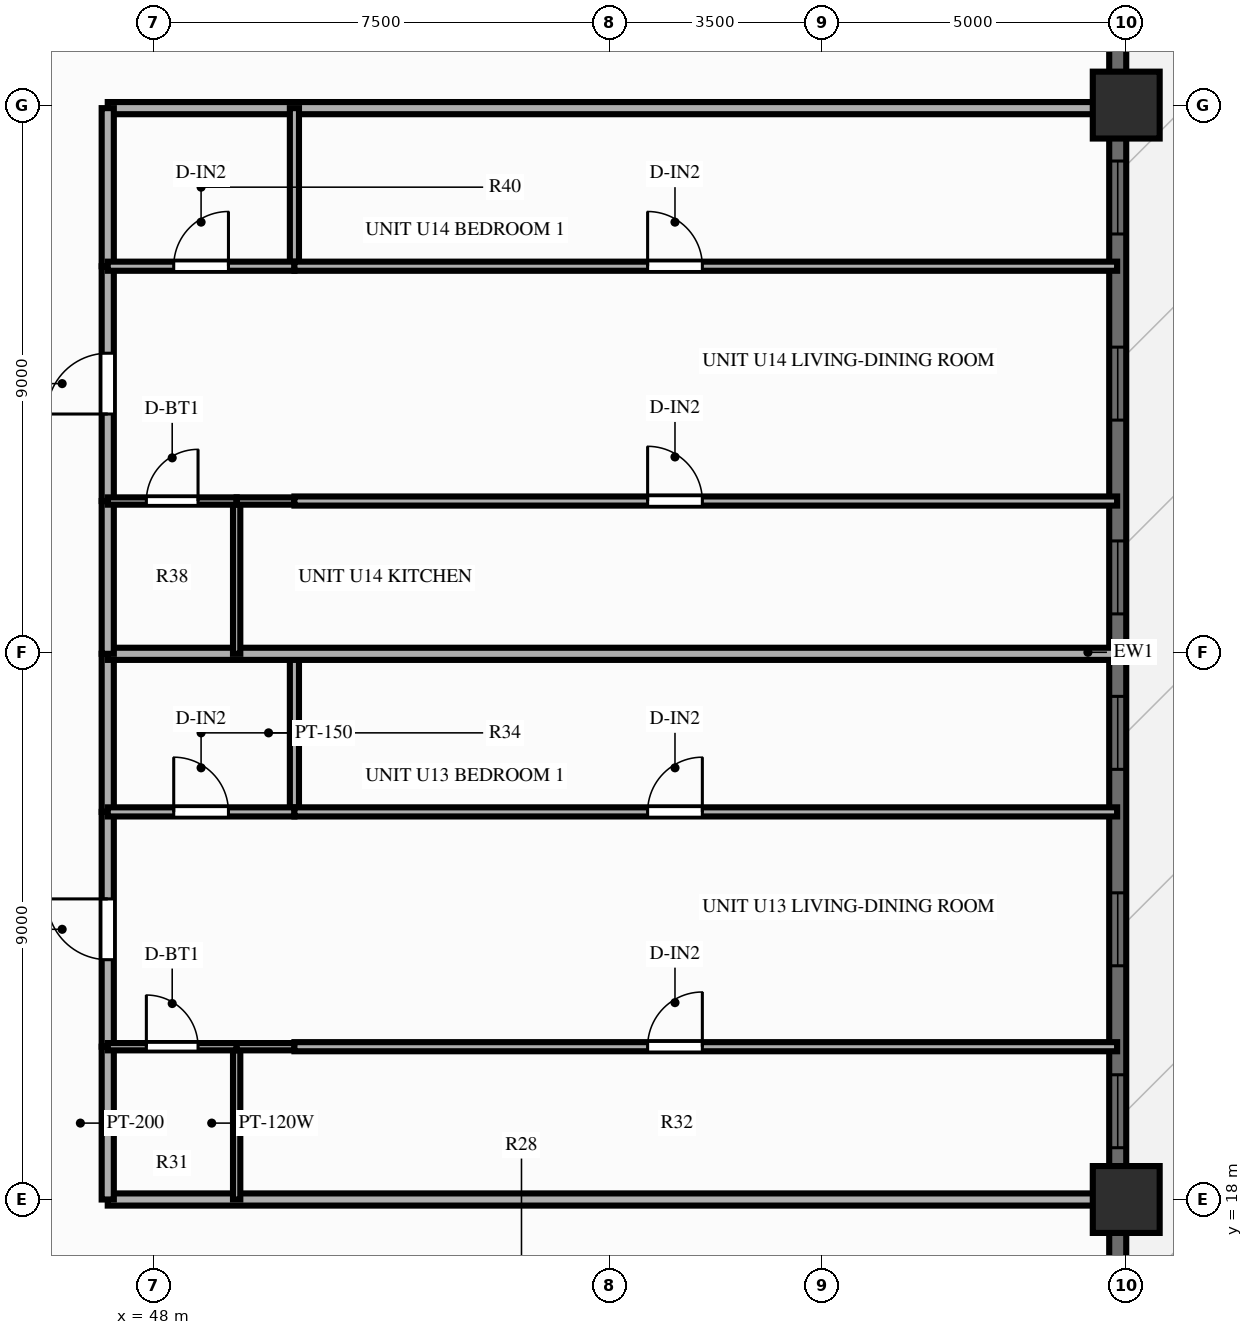
"""IFC4 building model, lengths in metres.
Left out: names, types, materials, properties, quantities, classifications, styles, units other than length and angle.
Written with IfcOpenShell. Run it as: python <this file> out.ifc"""

import sys

from ifc_helpers import new_model, si_unit, direction, frame, frame_2d, origin, origin_2d, place, context, subcontext, project, spatial, rectangle, extrude, source, transform, mapped, element, fill, save


model = new_model("IFC4")
c1 = context("Model", 3, precision=1e-05, world=origin(), true_north=direction((0.0, 1.0)))
c2 = subcontext(c1, "Body", "Model", "MODEL_VIEW")
j1 = project(units=[si_unit("LENGTHUNIT", "METRE"), si_unit("PLANEANGLEUNIT", "RADIAN")], contexts=[c1])
p1 = place(None, origin())
s1 = spatial("IfcSite", under=j1, at=p1, CompositionType="ELEMENT")
p2 = place(p1, origin())
s2 = spatial("IfcBuilding", under=s1, at=p2, CompositionType="ELEMENT")
p3 = place(p2, frame((0.0, 0.0, 22.4)))
s3 = spatial("IfcBuildingStorey", under=s2, at=p3, CompositionType="ELEMENT", Elevation=22.4)
m1 = source(origin(), c2, "Body", "SweptSolid", [
    extrude(rectangle(XDim=1.1, YDim=1.1, at=origin_2d()), origin(), (0.0, 0.0, 1.0), 3.0),
])
for number, where, z_axis, x_axis in (
    (1, (64.0, 18.0, 0.0), (0.0, 0.0, 1.0), (1.0, 0.0, 0.0)),
    (2, (64.0, 36.0, 0.0), (0.0, 0.0, 1.0), (1.0, 0.0, 0.0)),
):
    element("IfcColumn", number, at=place(p3, frame(where, z_axis=z_axis, x_axis=x_axis)), inside=s3, PredefinedType="COLUMN", context=c2, shape_type="MappedRepresentation", body=[
        mapped(m1, transform((0.0, 0.0, 0.0), scale=1.0)),
    ])
p4 = place(p3, frame((63.86, 6.5, 0.0), z_axis=(0.0, 0.0, 1.0), x_axis=(0.0, 1.0, 0.0)))
e3 = element("IfcWall", 3, at=p4, inside=s3, PredefinedType="SOLIDWALL", context=c2, shape_type="SweptSolid", body=[
    extrude(rectangle(XDim=41.0, YDim=0.28, at=frame_2d((20.5, 0.0))), origin(), (0.0, 0.0, 1.0), 2.28),
])
p5 = place(p4, frame((5.15, 0.0, 0.25)))
e4 = element("IfcOpeningElement", 4, at=p5, cuts=e3, PredefinedType="OPENING", context=c2, shape_type="SweptSolid", body=[
    extrude(rectangle(XDim=1.2, YDim=1.5, at=frame_2d((0.6, 0.75))), frame((0.0, 0.152, 0.0), z_axis=(0.0, -1.0, 0.0), x_axis=(1.0, 0.0, 0.0)), (0.0, 0.0, 1.0), 0.304),
])
p6 = place(p4, frame((12.352, 0.0, 0.25)))
e5 = element("IfcOpeningElement", 5, at=p6, cuts=e3, PredefinedType="OPENING", context=c2, shape_type="SweptSolid", body=[
    extrude(rectangle(XDim=1.2, YDim=1.5, at=frame_2d((0.6, 0.75))), frame((0.0, 0.152, 0.0), z_axis=(0.0, -1.0, 0.0), x_axis=(1.0, 0.0, 0.0)), (0.0, 0.0, 1.0), 0.304),
])
p7 = place(p4, frame((15.344, 0.0, 0.25)))
e6 = element("IfcOpeningElement", 6, at=p7, cuts=e3, PredefinedType="OPENING", context=c2, shape_type="SweptSolid", body=[
    extrude(rectangle(XDim=1.2, YDim=1.5, at=frame_2d((0.6, 0.75))), frame((0.0, 0.152, 0.0), z_axis=(0.0, -1.0, 0.0), x_axis=(1.0, 0.0, 0.0)), (0.0, 0.0, 1.0), 0.304),
])
p8 = place(p4, frame((18.575, 0.0, 0.25)))
e7 = element("IfcOpeningElement", 7, at=p8, cuts=e3, PredefinedType="OPENING", context=c2, shape_type="SweptSolid", body=[
    extrude(rectangle(XDim=1.2, YDim=1.5, at=frame_2d((0.6, 0.75))), frame((0.0, 0.152, 0.0), z_axis=(0.0, -1.0, 0.0), x_axis=(1.0, 0.0, 0.0)), (0.0, 0.0, 1.0), 0.304),
])
p9 = place(p4, frame((21.132, 0.0, 0.25)))
e8 = element("IfcOpeningElement", 8, at=p9, cuts=e3, PredefinedType="OPENING", context=c2, shape_type="SweptSolid", body=[
    extrude(rectangle(XDim=1.2, YDim=1.5, at=frame_2d((0.6, 0.75))), frame((0.0, 0.152, 0.0), z_axis=(0.0, -1.0, 0.0), x_axis=(1.0, 0.0, 0.0)), (0.0, 0.0, 1.0), 0.304),
])
p10 = place(p4, frame((24.319, 0.0, 0.25)))
e9 = element("IfcOpeningElement", 9, at=p10, cuts=e3, PredefinedType="OPENING", context=c2, shape_type="SweptSolid", body=[
    extrude(rectangle(XDim=1.2, YDim=1.5, at=frame_2d((0.6, 0.75))), frame((0.0, 0.152, 0.0), z_axis=(0.0, -1.0, 0.0), x_axis=(1.0, 0.0, 0.0)), (0.0, 0.0, 1.0), 0.304),
])
p11 = place(p4, frame((27.38, 0.0, 0.25)))
e10 = element("IfcOpeningElement", 10, at=p11, cuts=e3, PredefinedType="OPENING", context=c2, shape_type="SweptSolid", body=[
    extrude(rectangle(XDim=1.2, YDim=1.5, at=frame_2d((0.6, 0.75))), frame((0.0, 0.152, 0.0), z_axis=(0.0, -1.0, 0.0), x_axis=(1.0, 0.0, 0.0)), (0.0, 0.0, 1.0), 0.304),
])
p12 = place(p4, frame((36.05, 0.0, 0.0), z_axis=(0.0, 0.0, 1.0), x_axis=(-1.0, 0.0, 0.0)))
e11 = element("IfcOpeningElement", 11, at=p12, cuts=e3, PredefinedType="OPENING", context=c2, shape_type="SweptSolid", body=[
    extrude(rectangle(XDim=1.6, YDim=2.15, at=frame_2d((0.8, 1.075))), frame((0.0, 0.152, 0.0), z_axis=(0.0, -1.0, 0.0), x_axis=(1.0, 0.0, 0.0)), (0.0, 0.0, 1.0), 0.304),
])
for number, where, z_axis, x_axis in (
    (12, (47.25, 18.0, 0.0), (0.0, 0.0, 1.0), (1.0, 0.0, 0.0)),
    (13, (47.25, 35.95, 0.0), (0.0, 0.0, 1.0), (1.0, 0.0, 0.0)),
):
    element("IfcWall", number, at=place(p3, frame(where, z_axis=z_axis, x_axis=x_axis)), inside=s3, PredefinedType="PARTITIONING", context=c2, shape_type="SweptSolid", body=[
        extrude(rectangle(XDim=16.6, YDim=0.2, at=frame_2d((8.3, 0.0))), origin(), (0.0, 0.0, 1.0), 2.24),
    ])
p13 = place(p3, frame((47.25, 18.0, 0.0), z_axis=(0.0, 0.0, 1.0), x_axis=(0.0, 1.0, 0.0)))
e14 = element("IfcWall", 14, at=p13, inside=s3, PredefinedType="PARTITIONING", context=c2, shape_type="SweptSolid", body=[
    extrude(rectangle(XDim=2.513, YDim=0.2, at=frame_2d((1.256, 0.0))), origin(), (0.0, 0.0, 1.0), 2.79),
])
p14 = place(p3, frame((47.25, 20.513, 0.0), z_axis=(0.0, 0.0, 1.0), x_axis=(0.0, 1.0, 0.0)))
e15 = element("IfcWall", 15, at=p14, inside=s3, PredefinedType="PARTITIONING", context=c2, shape_type="SweptSolid", body=[
    extrude(rectangle(XDim=3.862, YDim=0.2, at=frame_2d((1.931, 0.0))), origin(), (0.0, 0.0, 1.0), 2.79),
])
p15 = place(p14, frame((1.431, 0.0, 0.0)))
e16 = element("IfcOpeningElement", 16, at=p15, cuts=e15, PredefinedType="OPENING", context=c2, shape_type="SweptSolid", body=[
    extrude(rectangle(XDim=1.0, YDim=2.15, at=frame_2d((0.5, 1.075))), frame((0.0, 0.112, 0.0), z_axis=(0.0, -1.0, 0.0), x_axis=(1.0, 0.0, 0.0)), (0.0, 0.0, 1.0), 0.224),
])
p16 = place(p3, frame((47.25, 24.375, 0.0), z_axis=(0.0, 0.0, 1.0), x_axis=(0.0, 1.0, 0.0)))
e17 = element("IfcWall", 17, at=p16, inside=s3, PredefinedType="PARTITIONING", context=c2, shape_type="SweptSolid", body=[
    extrude(rectangle(XDim=2.6, YDim=0.2, at=frame_2d((1.3, 0.0))), origin(), (0.0, 0.0, 1.0), 2.79),
])
p17 = place(p3, frame((49.37, 18.0, 0.0), z_axis=(0.0, 0.0, 1.0), x_axis=(0.0, 1.0, 0.0)))
e18 = element("IfcWall", 18, at=p17, inside=s3, PredefinedType="PARTITIONING", context=c2, shape_type="SweptSolid", body=[
    extrude(rectangle(XDim=2.513, YDim=0.12, at=frame_2d((1.256, 0.0))), origin(), (0.0, 0.0, 1.0), 2.79),
])
p18 = place(p3, frame((50.32, 24.375, 0.0), z_axis=(0.0, 0.0, 1.0), x_axis=(0.0, 1.0, 0.0)))
e19 = element("IfcWall", 19, at=p18, inside=s3, PredefinedType="PARTITIONING", context=c2, shape_type="SweptSolid", body=[
    extrude(rectangle(XDim=2.6, YDim=0.15, at=frame_2d((1.3, 0.0))), origin(), (0.0, 0.0, 1.0), 2.79),
])
p19 = place(p3, frame((47.25, 20.513, 0.0), z_axis=(0.0, 0.0, 1.0), x_axis=(1.0, 0.0, 0.0)))
e20 = element("IfcWall", 20, at=p19, inside=s3, PredefinedType="PARTITIONING", context=c2, shape_type="SweptSolid", body=[
    extrude(rectangle(XDim=2.12, YDim=0.12, at=frame_2d((1.06, 0.0))), origin(), (0.0, 0.0, 1.0), 2.79),
])
p20 = place(p19, frame((0.635, 0.0, 0.0)))
e21 = element("IfcOpeningElement", 21, at=p20, cuts=e20, PredefinedType="OPENING", context=c2, shape_type="SweptSolid", body=[
    extrude(rectangle(XDim=0.85, YDim=2.05, at=frame_2d((0.425, 1.025))), frame((0.0, 0.072, 0.0), z_axis=(0.0, -1.0, 0.0), x_axis=(1.0, 0.0, 0.0)), (0.0, 0.0, 1.0), 0.144),
])
p21 = place(p3, frame((49.37, 20.513, 0.0), z_axis=(0.0, 0.0, 1.0), x_axis=(1.0, 0.0, 0.0)))
e22 = element("IfcWall", 22, at=p21, inside=s3, PredefinedType="PARTITIONING", context=c2, shape_type="SweptSolid", body=[
    extrude(rectangle(XDim=0.95, YDim=0.12, at=frame_2d((0.475, 0.0))), origin(), (0.0, 0.0, 1.0), 2.79),
])
p22 = place(p3, frame((50.32, 20.513, 0.0), z_axis=(0.0, 0.0, 1.0), x_axis=(1.0, 0.0, 0.0)))
e23 = element("IfcWall", 23, at=p22, inside=s3, PredefinedType="PARTITIONING", context=c2, shape_type="SweptSolid", body=[
    extrude(rectangle(XDim=13.53, YDim=0.15, at=frame_2d((6.765, 0.0))), origin(), (0.0, 0.0, 1.0), 2.79),
])
p23 = place(p22, frame((5.809, 0.0, 0.0)))
e24 = element("IfcOpeningElement", 24, at=p23, cuts=e23, PredefinedType="OPENING", context=c2, shape_type="SweptSolid", body=[
    extrude(rectangle(XDim=0.9, YDim=2.1, at=frame_2d((0.45, 1.05))), frame((0.0, 0.087, 0.0), z_axis=(0.0, -1.0, 0.0), x_axis=(1.0, 0.0, 0.0)), (0.0, 0.0, 1.0), 0.174),
])
p24 = place(p3, frame((47.25, 24.375, 0.0), z_axis=(0.0, 0.0, 1.0), x_axis=(1.0, 0.0, 0.0)))
e25 = element("IfcWall", 25, at=p24, inside=s3, PredefinedType="PARTITIONING", context=c2, shape_type="SweptSolid", body=[
    extrude(rectangle(XDim=3.07, YDim=0.15, at=frame_2d((1.535, 0.0))), origin(), (0.0, 0.0, 1.0), 2.79),
])
p25 = place(p24, frame((1.085, 0.0, 0.0)))
e26 = element("IfcOpeningElement", 26, at=p25, cuts=e25, PredefinedType="OPENING", context=c2, shape_type="SweptSolid", body=[
    extrude(rectangle(XDim=0.9, YDim=2.1, at=frame_2d((0.45, 1.05))), frame((0.0, 0.087, 0.0), z_axis=(0.0, -1.0, 0.0), x_axis=(1.0, 0.0, 0.0)), (0.0, 0.0, 1.0), 0.174),
])
p26 = place(p3, frame((50.32, 24.375, 0.0), z_axis=(0.0, 0.0, 1.0), x_axis=(1.0, 0.0, 0.0)))
e27 = element("IfcWall", 27, at=p26, inside=s3, PredefinedType="PARTITIONING", context=c2, shape_type="SweptSolid", body=[
    extrude(rectangle(XDim=13.53, YDim=0.15, at=frame_2d((6.765, 0.0))), origin(), (0.0, 0.0, 1.0), 2.79),
])
p27 = place(p26, frame((5.809, 0.0, 0.0)))
e28 = element("IfcOpeningElement", 28, at=p27, cuts=e27, PredefinedType="OPENING", context=c2, shape_type="SweptSolid", body=[
    extrude(rectangle(XDim=0.9, YDim=2.1, at=frame_2d((0.45, 1.05))), frame((0.0, 0.087, 0.0), z_axis=(0.0, -1.0, 0.0), x_axis=(1.0, 0.0, 0.0)), (0.0, 0.0, 1.0), 0.174),
])
p28 = place(p3, frame((47.25, 26.975, 0.0), z_axis=(0.0, 0.0, 1.0), x_axis=(1.0, 0.0, 0.0)))
e29 = element("IfcWall", 29, at=p28, inside=s3, PredefinedType="PARTITIONING", context=c2, shape_type="SweptSolid", body=[
    extrude(rectangle(XDim=16.6, YDim=0.2, at=frame_2d((8.3, 0.0))), origin(), (0.0, 0.0, 1.0), 2.79),
])
p29 = place(p3, frame((47.25, 26.975, 0.0), z_axis=(0.0, 0.0, 1.0), x_axis=(0.0, 1.0, 0.0)))
e30 = element("IfcWall", 30, at=p29, inside=s3, PredefinedType="PARTITIONING", context=c2, shape_type="SweptSolid", body=[
    extrude(rectangle(XDim=2.513, YDim=0.2, at=frame_2d((1.256, 0.0))), origin(), (0.0, 0.0, 1.0), 2.79),
])
p30 = place(p3, frame((47.25, 29.488, 0.0), z_axis=(0.0, 0.0, 1.0), x_axis=(0.0, 1.0, 0.0)))
e31 = element("IfcWall", 31, at=p30, inside=s3, PredefinedType="PARTITIONING", context=c2, shape_type="SweptSolid", body=[
    extrude(rectangle(XDim=3.862, YDim=0.2, at=frame_2d((1.931, 0.0))), origin(), (0.0, 0.0, 1.0), 2.79),
])
p31 = place(p30, frame((1.431, 0.0, 0.0)))
e32 = element("IfcOpeningElement", 32, at=p31, cuts=e31, PredefinedType="OPENING", context=c2, shape_type="SweptSolid", body=[
    extrude(rectangle(XDim=1.0, YDim=2.15, at=frame_2d((0.5, 1.075))), frame((0.0, 0.112, 0.0), z_axis=(0.0, -1.0, 0.0), x_axis=(1.0, 0.0, 0.0)), (0.0, 0.0, 1.0), 0.224),
])
p32 = place(p3, frame((47.25, 33.35, 0.0), z_axis=(0.0, 0.0, 1.0), x_axis=(0.0, 1.0, 0.0)))
e33 = element("IfcWall", 33, at=p32, inside=s3, PredefinedType="PARTITIONING", context=c2, shape_type="SweptSolid", body=[
    extrude(rectangle(XDim=2.6, YDim=0.2, at=frame_2d((1.3, 0.0))), origin(), (0.0, 0.0, 1.0), 2.79),
])
p33 = place(p3, frame((49.37, 26.975, 0.0), z_axis=(0.0, 0.0, 1.0), x_axis=(0.0, 1.0, 0.0)))
e34 = element("IfcWall", 34, at=p33, inside=s3, PredefinedType="PARTITIONING", context=c2, shape_type="SweptSolid", body=[
    extrude(rectangle(XDim=2.513, YDim=0.12, at=frame_2d((1.256, 0.0))), origin(), (0.0, 0.0, 1.0), 2.79),
])
p34 = place(p3, frame((50.32, 33.35, 0.0), z_axis=(0.0, 0.0, 1.0), x_axis=(0.0, 1.0, 0.0)))
e35 = element("IfcWall", 35, at=p34, inside=s3, PredefinedType="PARTITIONING", context=c2, shape_type="SweptSolid", body=[
    extrude(rectangle(XDim=2.6, YDim=0.15, at=frame_2d((1.3, 0.0))), origin(), (0.0, 0.0, 1.0), 2.79),
])
p35 = place(p3, frame((47.25, 29.488, 0.0), z_axis=(0.0, 0.0, 1.0), x_axis=(1.0, 0.0, 0.0)))
e36 = element("IfcWall", 36, at=p35, inside=s3, PredefinedType="PARTITIONING", context=c2, shape_type="SweptSolid", body=[
    extrude(rectangle(XDim=2.12, YDim=0.12, at=frame_2d((1.06, 0.0))), origin(), (0.0, 0.0, 1.0), 2.79),
])
p36 = place(p35, frame((0.635, 0.0, 0.0)))
e37 = element("IfcOpeningElement", 37, at=p36, cuts=e36, PredefinedType="OPENING", context=c2, shape_type="SweptSolid", body=[
    extrude(rectangle(XDim=0.85, YDim=2.05, at=frame_2d((0.425, 1.025))), frame((0.0, 0.072, 0.0), z_axis=(0.0, -1.0, 0.0), x_axis=(1.0, 0.0, 0.0)), (0.0, 0.0, 1.0), 0.144),
])
p37 = place(p3, frame((49.37, 29.488, 0.0), z_axis=(0.0, 0.0, 1.0), x_axis=(1.0, 0.0, 0.0)))
e38 = element("IfcWall", 38, at=p37, inside=s3, PredefinedType="PARTITIONING", context=c2, shape_type="SweptSolid", body=[
    extrude(rectangle(XDim=0.95, YDim=0.12, at=frame_2d((0.475, 0.0))), origin(), (0.0, 0.0, 1.0), 2.79),
])
p38 = place(p3, frame((50.32, 29.488, 0.0), z_axis=(0.0, 0.0, 1.0), x_axis=(1.0, 0.0, 0.0)))
e39 = element("IfcWall", 39, at=p38, inside=s3, PredefinedType="PARTITIONING", context=c2, shape_type="SweptSolid", body=[
    extrude(rectangle(XDim=13.53, YDim=0.15, at=frame_2d((6.765, 0.0))), origin(), (0.0, 0.0, 1.0), 2.79),
])
p39 = place(p38, frame((5.809, 0.0, 0.0)))
e40 = element("IfcOpeningElement", 40, at=p39, cuts=e39, PredefinedType="OPENING", context=c2, shape_type="SweptSolid", body=[
    extrude(rectangle(XDim=0.9, YDim=2.1, at=frame_2d((0.45, 1.05))), frame((0.0, 0.087, 0.0), z_axis=(0.0, -1.0, 0.0), x_axis=(1.0, 0.0, 0.0)), (0.0, 0.0, 1.0), 0.174),
])
p40 = place(p3, frame((47.25, 33.35, 0.0), z_axis=(0.0, 0.0, 1.0), x_axis=(1.0, 0.0, 0.0)))
e41 = element("IfcWall", 41, at=p40, inside=s3, PredefinedType="PARTITIONING", context=c2, shape_type="SweptSolid", body=[
    extrude(rectangle(XDim=3.07, YDim=0.15, at=frame_2d((1.535, 0.0))), origin(), (0.0, 0.0, 1.0), 2.79),
])
p41 = place(p40, frame((1.085, 0.0, 0.0)))
e42 = element("IfcOpeningElement", 42, at=p41, cuts=e41, PredefinedType="OPENING", context=c2, shape_type="SweptSolid", body=[
    extrude(rectangle(XDim=0.9, YDim=2.1, at=frame_2d((0.45, 1.05))), frame((0.0, 0.087, 0.0), z_axis=(0.0, -1.0, 0.0), x_axis=(1.0, 0.0, 0.0)), (0.0, 0.0, 1.0), 0.174),
])
p42 = place(p3, frame((50.32, 33.35, 0.0), z_axis=(0.0, 0.0, 1.0), x_axis=(1.0, 0.0, 0.0)))
e43 = element("IfcWall", 43, at=p42, inside=s3, PredefinedType="PARTITIONING", context=c2, shape_type="SweptSolid", body=[
    extrude(rectangle(XDim=13.53, YDim=0.15, at=frame_2d((6.765, 0.0))), origin(), (0.0, 0.0, 1.0), 2.79),
])
p43 = place(p42, frame((5.809, 0.0, 0.0)))
e44 = element("IfcOpeningElement", 44, at=p43, cuts=e43, PredefinedType="OPENING", context=c2, shape_type="SweptSolid", body=[
    extrude(rectangle(XDim=0.9, YDim=2.1, at=frame_2d((0.45, 1.05))), frame((0.0, 0.087, 0.0), z_axis=(0.0, -1.0, 0.0), x_axis=(1.0, 0.0, 0.0)), (0.0, 0.0, 1.0), 0.174),
])
m2 = source(origin(), c2, "Body", "SweptSolid", [
    extrude(rectangle(XDim=1.2, YDim=1.5, at=frame_2d((0.6, 0.75))), frame((0.0, 0.03, 0.0), z_axis=(0.0, -1.0, 0.0), x_axis=(1.0, 0.0, 0.0)), (0.0, 0.0, 1.0), 0.06),
])
p44 = place(p6, origin())
e45 = element("IfcWindow", 45, at=p44, inside=s3, PartitioningType="SINGLE_PANEL", PredefinedType="WINDOW", context=c2, shape_type="MappedRepresentation", body=[
    mapped(m2, transform((0.0, 0.0, 0.0), scale=1.0)),
])
fill(e5, e45)
p45 = place(p7, origin())
e46 = element("IfcWindow", 46, at=p45, inside=s3, PartitioningType="SINGLE_PANEL", PredefinedType="WINDOW", context=c2, shape_type="MappedRepresentation", body=[
    mapped(m2, transform((0.0, 0.0, 0.0), scale=1.0)),
])
fill(e6, e46)
p46 = place(p8, origin())
e47 = element("IfcWindow", 47, at=p46, inside=s3, PartitioningType="SINGLE_PANEL", PredefinedType="WINDOW", context=c2, shape_type="MappedRepresentation", body=[
    mapped(m2, transform((0.0, 0.0, 0.0), scale=1.0)),
])
fill(e7, e47)
p47 = place(p9, origin())
e48 = element("IfcWindow", 48, at=p47, inside=s3, PartitioningType="SINGLE_PANEL", PredefinedType="WINDOW", context=c2, shape_type="MappedRepresentation", body=[
    mapped(m2, transform((0.0, 0.0, 0.0), scale=1.0)),
])
fill(e8, e48)
p48 = place(p10, origin())
e49 = element("IfcWindow", 49, at=p48, inside=s3, PartitioningType="SINGLE_PANEL", PredefinedType="WINDOW", context=c2, shape_type="MappedRepresentation", body=[
    mapped(m2, transform((0.0, 0.0, 0.0), scale=1.0)),
])
fill(e9, e49)
p49 = place(p11, origin())
e50 = element("IfcWindow", 50, at=p49, inside=s3, PartitioningType="SINGLE_PANEL", PredefinedType="WINDOW", context=c2, shape_type="MappedRepresentation", body=[
    mapped(m2, transform((0.0, 0.0, 0.0), scale=1.0)),
])
fill(e10, e50)
m3 = source(origin(), c2, "Body", "SweptSolid", [
    extrude(rectangle(XDim=1.0, YDim=2.15, at=frame_2d((0.5, 1.075))), frame((0.0, 0.025, 0.0), z_axis=(0.0, -1.0, 0.0), x_axis=(1.0, 0.0, 0.0)), (0.0, 0.0, 1.0), 0.05),
])
p50 = place(p15, origin())
e51 = element("IfcDoor", 51, at=p50, inside=s3, OperationType="SINGLE_SWING_RIGHT", PredefinedType="DOOR", context=c2, shape_type="MappedRepresentation", body=[
    mapped(m3, transform((0.0, 0.0, 0.0), scale=1.0)),
])
fill(e16, e51)
m4 = source(origin(), c2, "Body", "SweptSolid", [
    extrude(rectangle(XDim=0.85, YDim=2.05, at=frame_2d((0.425, 1.025))), frame((0.0, 0.025, 0.0), z_axis=(0.0, -1.0, 0.0), x_axis=(1.0, 0.0, 0.0)), (0.0, 0.0, 1.0), 0.05),
])
p51 = place(p20, origin())
e52 = element("IfcDoor", 52, at=p51, inside=s3, OperationType="SINGLE_SWING_LEFT", PredefinedType="DOOR", context=c2, shape_type="MappedRepresentation", body=[
    mapped(m4, transform((0.0, 0.0, 0.0), scale=1.0)),
])
fill(e21, e52)
m5 = source(origin(), c2, "Body", "SweptSolid", [
    extrude(rectangle(XDim=0.9, YDim=2.1, at=frame_2d((0.45, 1.05))), frame((0.0, 0.025, 0.0), z_axis=(0.0, -1.0, 0.0), x_axis=(1.0, 0.0, 0.0)), (0.0, 0.0, 1.0), 0.05),
])
p52 = place(p23, origin())
e53 = element("IfcDoor", 53, at=p52, inside=s3, OperationType="SINGLE_SWING_RIGHT", PredefinedType="DOOR", context=c2, shape_type="MappedRepresentation", body=[
    mapped(m5, transform((0.0, 0.0, 0.0), scale=1.0)),
])
fill(e24, e53)
p53 = place(p25, origin())
e54 = element("IfcDoor", 54, at=p53, inside=s3, OperationType="SINGLE_SWING_LEFT", PredefinedType="DOOR", context=c2, shape_type="MappedRepresentation", body=[
    mapped(m5, transform((0.0, 0.0, 0.0), scale=1.0)),
])
fill(e26, e54)
p54 = place(p27, origin())
e55 = element("IfcDoor", 55, at=p54, inside=s3, OperationType="SINGLE_SWING_RIGHT", PredefinedType="DOOR", context=c2, shape_type="MappedRepresentation", body=[
    mapped(m5, transform((0.0, 0.0, 0.0), scale=1.0)),
])
fill(e28, e55)
p55 = place(p31, origin())
e56 = element("IfcDoor", 56, at=p55, inside=s3, OperationType="SINGLE_SWING_LEFT", PredefinedType="DOOR", context=c2, shape_type="MappedRepresentation", body=[
    mapped(m3, transform((0.0, 0.0, 0.0), scale=1.0)),
])
fill(e32, e56)
p56 = place(p36, origin())
e57 = element("IfcDoor", 57, at=p56, inside=s3, OperationType="SINGLE_SWING_RIGHT", PredefinedType="DOOR", context=c2, shape_type="MappedRepresentation", body=[
    mapped(m4, transform((0.0, 0.0, 0.0), scale=1.0)),
])
fill(e37, e57)
p57 = place(p39, origin())
e58 = element("IfcDoor", 58, at=p57, inside=s3, OperationType="SINGLE_SWING_LEFT", PredefinedType="DOOR", context=c2, shape_type="MappedRepresentation", body=[
    mapped(m5, transform((0.0, 0.0, 0.0), scale=1.0)),
])
fill(e40, e58)
p58 = place(p41, origin())
e59 = element("IfcDoor", 59, at=p58, inside=s3, OperationType="SINGLE_SWING_RIGHT", PredefinedType="DOOR", context=c2, shape_type="MappedRepresentation", body=[
    mapped(m5, transform((0.0, 0.0, 0.0), scale=1.0)),
])
fill(e42, e59)
p59 = place(p43, origin())
e60 = element("IfcDoor", 60, at=p59, inside=s3, OperationType="SINGLE_SWING_LEFT", PredefinedType="DOOR", context=c2, shape_type="MappedRepresentation", body=[
    mapped(m5, transform((0.0, 0.0, 0.0), scale=1.0)),
])
fill(e44, e60)
save(model, sys.argv[1])
